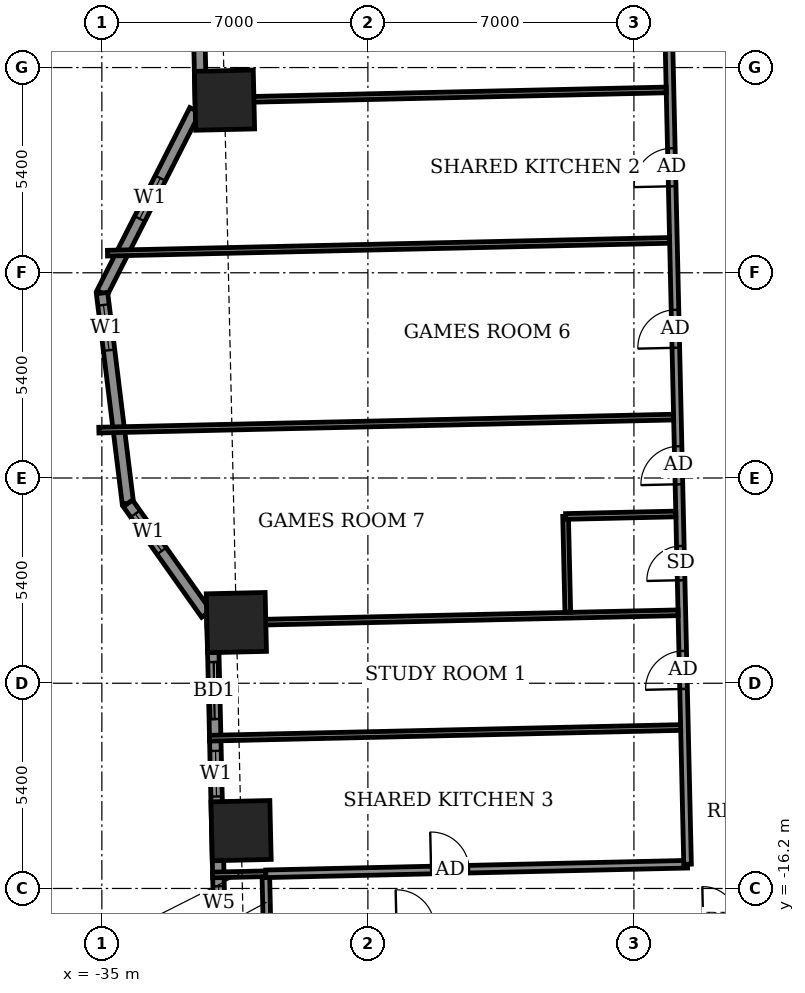
"""IFC4 building model, lengths in metres.
Left out: names, types, materials, properties, quantities, classifications, styles, units other than length and angle.
Written with IfcOpenShell. Run it as: python <this file> out.ifc"""

import sys

from ifc_helpers import new_model, si_unit, direction, frame, frame_2d, origin, origin_2d, place, context, subcontext, project, spatial, rectangle, extrude, element, fill, save


model = new_model("IFC4")
c1 = context("Model", 3, precision=1e-05, world=origin(), true_north=direction((0.0, 1.0)))
c2 = subcontext(c1, "Body", "Model", "MODEL_VIEW")
j1 = project(units=[si_unit("LENGTHUNIT", "METRE"), si_unit("PLANEANGLEUNIT", "RADIAN")], contexts=[c1])
p1 = place(None, origin())
s1 = spatial("IfcSite", under=j1, at=p1, CompositionType="ELEMENT")
p2 = place(p1, origin())
s2 = spatial("IfcBuilding", under=s1, at=p2, CompositionType="ELEMENT")
p3 = place(p2, frame((0.0, 0.0, 34.1)))
s3 = spatial("IfcBuildingStorey", under=s2, at=p3, CompositionType="ELEMENT", Elevation=34.1)
for number, where, z_axis, x_axis in (
    (1, (-31.461, -9.204, -0.55), (0.0, 0.0, 1.0), (0.023, -1.0, 0.0)),
    (2, (-31.337, -14.678, -0.55), (0.0, 0.0, 1.0), (0.023, -1.0, 0.0)),
    (3, (-31.773, 4.542, -0.55), (0.0, 0.0, 1.0), (0.023, -1.0, 0.0)),
):
    element("IfcColumn", number, at=place(p3, frame(where, z_axis=z_axis, x_axis=x_axis)), inside=s3, PredefinedType="COLUMN", context=c2, shape_type="SweptSolid", body=[
        extrude(rectangle(XDim=1.55, YDim=1.55, at=origin_2d()), origin(), (0.0, 0.0, 1.0), 3.6),
    ])
p4 = place(p3, frame((-32.758, 20.399, 0.0), z_axis=(0.0, 0.0, 1.0), x_axis=(0.022668485183, -0.999743036875, 0.0)))
e4 = element("IfcWall", 4, at=p4, inside=s3, PredefinedType="SOLIDWALL", context=c2, shape_type="SweptSolid", body=[
    extrude(rectangle(XDim=15.929, YDim=0.3, at=frame_2d((7.964, 0.0))), origin(), (0.0, 0.0, 1.0), 3.05),
])
p5 = place(p4, frame((2.183, 0.0, 0.0)))
e5 = element("IfcOpeningElement", 5, at=p5, cuts=e4, PredefinedType="OPENING", context=c2, shape_type="SweptSolid", body=[
    extrude(rectangle(XDim=1.5, YDim=2.4, at=frame_2d((0.75, 1.2))), frame((0.0, 0.16, 0.0), z_axis=(0.0, -1.0, 0.0), x_axis=(1.0, 0.0, 0.0)), (0.0, 0.0, 1.0), 0.32),
])
p6 = place(p4, frame((12.004, 0.0, 0.9)))
e6 = element("IfcOpeningElement", 6, at=p6, cuts=e4, PredefinedType="OPENING", context=c2, shape_type="SweptSolid", body=[
    extrude(rectangle(XDim=2.4, YDim=1.5, at=frame_2d((1.2, 0.75))), frame((0.0, 0.16, 0.0), z_axis=(0.0, -1.0, 0.0), x_axis=(1.0, 0.0, 0.0)), (0.0, 0.0, 1.0), 0.32),
])
p7 = place(p3, frame((-32.552, 4.28, 0.0), z_axis=(0.0, 0.0, 1.0), x_axis=(-0.452703975507, -0.891660871946, 0.0)))
e7 = element("IfcWall", 7, at=p7, inside=s3, PredefinedType="SOLIDWALL", context=c2, shape_type="SweptSolid", body=[
    extrude(rectangle(XDim=5.399, YDim=0.3, at=frame_2d((2.699, 0.0))), origin(), (0.0, 0.0, 1.0), 3.05),
])
p8 = place(p7, frame((2.007, 0.0, 0.9)))
e8 = element("IfcOpeningElement", 8, at=p8, cuts=e7, PredefinedType="OPENING", context=c2, shape_type="SweptSolid", body=[
    extrude(rectangle(XDim=1.2, YDim=1.5, at=frame_2d((0.6, 0.75))), frame((0.0, 0.16, 0.0), z_axis=(0.0, -1.0, 0.0), x_axis=(1.0, 0.0, 0.0)), (0.0, 0.0, 1.0), 0.32),
])
p9 = place(p3, frame((-34.996, -0.534, 0.0), z_axis=(0.0, 0.0, 1.0), x_axis=(0.122206978992, -0.992504636909, 0.0)))
e9 = element("IfcWall", 9, at=p9, inside=s3, PredefinedType="SOLIDWALL", context=c2, shape_type="SweptSolid", body=[
    extrude(rectangle(XDim=5.574, YDim=0.3, at=frame_2d((2.787, 0.0))), origin(), (0.0, 0.0, 1.0), 3.05),
])
p10 = place(p9, frame((0.315, 0.0, 0.9)))
e10 = element("IfcOpeningElement", 10, at=p10, cuts=e9, PredefinedType="OPENING", context=c2, shape_type="SweptSolid", body=[
    extrude(rectangle(XDim=1.2, YDim=1.5, at=frame_2d((0.6, 0.75))), frame((0.0, 0.16, 0.0), z_axis=(0.0, -1.0, 0.0), x_axis=(1.0, 0.0, 0.0)), (0.0, 0.0, 1.0), 0.32),
])
p11 = place(p3, frame((-34.315, -6.066, 0.0), z_axis=(0.0, 0.0, 1.0), x_axis=(0.578062893695, -0.815992212544, 0.0)))
e11 = element("IfcWall", 11, at=p11, inside=s3, PredefinedType="SOLIDWALL", context=c2, shape_type="SweptSolid", body=[
    extrude(rectangle(XDim=3.569, YDim=0.3, at=frame_2d((1.784, 0.0))), origin(), (0.0, 0.0, 1.0), 3.05),
])
p12 = place(p11, frame((0.338, 0.0, 0.9)))
e12 = element("IfcOpeningElement", 12, at=p12, cuts=e11, PredefinedType="OPENING", context=c2, shape_type="SweptSolid", body=[
    extrude(rectangle(XDim=1.2, YDim=1.5, at=frame_2d((0.6, 0.75))), frame((0.0, 0.16, 0.0), z_axis=(0.0, -1.0, 0.0), x_axis=(1.0, 0.0, 0.0)), (0.0, 0.0, 1.0), 0.32),
])
p13 = place(p3, frame((-32.087, -9.164, 0.0), z_axis=(0.0, 0.0, 1.0), x_axis=(0.022651102902, -0.999743430855, 0.0)))
e13 = element("IfcWall", 13, at=p13, inside=s3, PredefinedType="SOLIDWALL", context=c2, shape_type="SweptSolid", body=[
    extrude(rectangle(XDim=16.329, YDim=0.3, at=frame_2d((8.165, 0.0))), origin(), (0.0, 0.0, 1.0), 3.05),
])
p14 = place(p13, frame((1.079, 0.0, 0.0)))
e14 = element("IfcOpeningElement", 14, at=p14, cuts=e13, PredefinedType="OPENING", context=c2, shape_type="SweptSolid", body=[
    extrude(rectangle(XDim=1.5, YDim=2.4, at=frame_2d((0.75, 1.2))), frame((0.0, 0.16, 0.0), z_axis=(0.0, -1.0, 0.0), x_axis=(1.0, 0.0, 0.0)), (0.0, 0.0, 1.0), 0.32),
])
p15 = place(p13, frame((3.417, 0.0, 0.9)))
e15 = element("IfcOpeningElement", 15, at=p15, cuts=e13, PredefinedType="OPENING", context=c2, shape_type="SweptSolid", body=[
    extrude(rectangle(XDim=1.2, YDim=1.5, at=frame_2d((0.6, 0.75))), frame((0.0, 0.16, 0.0), z_axis=(0.0, -1.0, 0.0), x_axis=(1.0, 0.0, 0.0)), (0.0, 0.0, 1.0), 0.32),
])
p16 = place(p13, frame((6.979, 0.0, 0.9)))
e16 = element("IfcOpeningElement", 16, at=p16, cuts=e13, PredefinedType="OPENING", context=c2, shape_type="SweptSolid", body=[
    extrude(rectangle(XDim=0.9, YDim=1.5, at=frame_2d((0.45, 0.75))), frame((0.0, 0.16, 0.0), z_axis=(0.0, -1.0, 0.0), x_axis=(1.0, 0.0, 0.0)), (0.0, 0.0, 1.0), 0.32),
])
p17 = place(p13, frame((12.15, 0.0, 0.9)))
e17 = element("IfcOpeningElement", 17, at=p17, cuts=e13, PredefinedType="OPENING", context=c2, shape_type="SweptSolid", body=[
    extrude(rectangle(XDim=2.4, YDim=1.5, at=frame_2d((1.2, 0.75))), frame((0.0, 0.16, 0.0), z_axis=(0.0, -1.0, 0.0), x_axis=(1.0, 0.0, 0.0)), (0.0, 0.0, 1.0), 0.32),
])
p18 = place(p3, frame((-30.652, -17.313, 0.0), z_axis=(0.0, 0.0, 1.0), x_axis=(0.999742623764, 0.02268669719, 0.0)))
e18 = element("IfcWall", 18, at=p18, inside=s3, PredefinedType="PARTITIONING", context=c2, shape_type="SweptSolid", body=[
    extrude(rectangle(XDim=58.8, YDim=0.2, at=frame_2d((29.4, 0.0))), origin(), (0.0, 0.0, 1.0), 3.05),
])
p19 = place(p18, frame((3.406, 0.0, 0.0)))
e19 = element("IfcOpeningElement", 19, at=p19, cuts=e18, PredefinedType="OPENING", context=c2, shape_type="SweptSolid", body=[
    extrude(rectangle(XDim=1.0, YDim=2.1, at=frame_2d((0.5, 1.05))), frame((0.0, 0.11, 0.0), z_axis=(0.0, -1.0, 0.0), x_axis=(1.0, 0.0, 0.0)), (0.0, 0.0, 1.0), 0.22),
])
p20 = place(p18, frame((11.475, 0.0, 0.0)))
e20 = element("IfcOpeningElement", 20, at=p20, cuts=e18, PredefinedType="OPENING", context=c2, shape_type="SweptSolid", body=[
    extrude(rectangle(XDim=0.9, YDim=2.1, at=frame_2d((0.45, 1.05))), frame((0.0, 0.11, 0.0), z_axis=(0.0, -1.0, 0.0), x_axis=(1.0, 0.0, 0.0)), (0.0, 0.0, 1.0), 0.22),
])
p21 = place(p18, frame((13.55, 0.0, 0.0)))
e21 = element("IfcOpeningElement", 21, at=p21, cuts=e18, PredefinedType="OPENING", context=c2, shape_type="SweptSolid", body=[
    extrude(rectangle(XDim=0.9, YDim=2.1, at=frame_2d((0.45, 1.05))), frame((0.0, 0.11, 0.0), z_axis=(0.0, -1.0, 0.0), x_axis=(1.0, 0.0, 0.0)), (0.0, 0.0, 1.0), 0.22),
])
p22 = place(p18, frame((20.375, 0.0, 0.0)))
e22 = element("IfcOpeningElement", 22, at=p22, cuts=e18, PredefinedType="OPENING", context=c2, shape_type="SweptSolid", body=[
    extrude(rectangle(XDim=0.9, YDim=2.1, at=frame_2d((0.45, 1.05))), frame((0.0, 0.11, 0.0), z_axis=(0.0, -1.0, 0.0), x_axis=(1.0, 0.0, 0.0)), (0.0, 0.0, 1.0), 0.22),
])
p23 = place(p18, frame((22.625, 0.0, 0.0)))
e23 = element("IfcOpeningElement", 23, at=p23, cuts=e18, PredefinedType="OPENING", context=c2, shape_type="SweptSolid", body=[
    extrude(rectangle(XDim=0.9, YDim=2.1, at=frame_2d((0.45, 1.05))), frame((0.0, 0.11, 0.0), z_axis=(0.0, -1.0, 0.0), x_axis=(1.0, 0.0, 0.0)), (0.0, 0.0, 1.0), 0.22),
])
p24 = place(p18, frame((29.65, 0.0, 0.0)))
e24 = element("IfcOpeningElement", 24, at=p24, cuts=e18, PredefinedType="OPENING", context=c2, shape_type="SweptSolid", body=[
    extrude(rectangle(XDim=0.9, YDim=2.1, at=frame_2d((0.45, 1.05))), frame((0.0, 0.11, 0.0), z_axis=(0.0, -1.0, 0.0), x_axis=(1.0, 0.0, 0.0)), (0.0, 0.0, 1.0), 0.22),
])
p25 = place(p18, frame((31.875, 0.0, 0.0)))
e25 = element("IfcOpeningElement", 25, at=p25, cuts=e18, PredefinedType="OPENING", context=c2, shape_type="SweptSolid", body=[
    extrude(rectangle(XDim=0.9, YDim=2.1, at=frame_2d((0.45, 1.05))), frame((0.0, 0.11, 0.0), z_axis=(0.0, -1.0, 0.0), x_axis=(1.0, 0.0, 0.0)), (0.0, 0.0, 1.0), 0.22),
])
p26 = place(p18, frame((38.9, 0.0, 0.0)))
e26 = element("IfcOpeningElement", 26, at=p26, cuts=e18, PredefinedType="OPENING", context=c2, shape_type="SweptSolid", body=[
    extrude(rectangle(XDim=0.9, YDim=2.1, at=frame_2d((0.45, 1.05))), frame((0.0, 0.11, 0.0), z_axis=(0.0, -1.0, 0.0), x_axis=(1.0, 0.0, 0.0)), (0.0, 0.0, 1.0), 0.22),
])
p27 = place(p18, frame((41.025, 0.0, 0.0)))
e27 = element("IfcOpeningElement", 27, at=p27, cuts=e18, PredefinedType="OPENING", context=c2, shape_type="SweptSolid", body=[
    extrude(rectangle(XDim=0.9, YDim=2.1, at=frame_2d((0.45, 1.05))), frame((0.0, 0.11, 0.0), z_axis=(0.0, -1.0, 0.0), x_axis=(1.0, 0.0, 0.0)), (0.0, 0.0, 1.0), 0.22),
])
p28 = place(p18, frame((47.95, 0.0, 0.0)))
e28 = element("IfcOpeningElement", 28, at=p28, cuts=e18, PredefinedType="OPENING", context=c2, shape_type="SweptSolid", body=[
    extrude(rectangle(XDim=0.9, YDim=2.1, at=frame_2d((0.45, 1.05))), frame((0.0, 0.11, 0.0), z_axis=(0.0, -1.0, 0.0), x_axis=(1.0, 0.0, 0.0)), (0.0, 0.0, 1.0), 0.22),
])
p29 = place(p18, frame((55.6, 0.0, 0.0)))
e29 = element("IfcOpeningElement", 29, at=p29, cuts=e18, PredefinedType="OPENING", context=c2, shape_type="SweptSolid", body=[
    extrude(rectangle(XDim=1.0, YDim=2.1, at=frame_2d((0.5, 1.05))), frame((0.0, 0.11, 0.0), z_axis=(0.0, -1.0, 0.0), x_axis=(1.0, 0.0, 0.0)), (0.0, 0.0, 1.0), 0.22),
])
p30 = place(p18, frame((50.25, 0.0, 0.0)))
e30 = element("IfcOpeningElement", 30, at=p30, cuts=e18, PredefinedType="OPENING", context=c2, shape_type="SweptSolid", body=[
    extrude(rectangle(XDim=0.9, YDim=2.1, at=frame_2d((0.45, 1.05))), frame((0.0, 0.11, 0.0), z_axis=(0.0, -1.0, 0.0), x_axis=(1.0, 0.0, 0.0)), (0.0, 0.0, 1.0), 0.22),
])
p31 = place(p3, frame((-30.652, -17.313, 0.0), z_axis=(0.0, 0.0, 1.0), x_axis=(-0.022632637625, 0.99974384905, 0.0)))
e31 = element("IfcWall", 31, at=p31, inside=s3, PredefinedType="PARTITIONING", context=c2, shape_type="SweptSolid", body=[
    extrude(rectangle(XDim=1.5, YDim=0.2, at=frame_2d((0.75, 0.0))), origin(), (0.0, 0.0, 1.0), 3.05),
])
p32 = place(p3, frame((-32.086, -15.845, 0.0), z_axis=(0.0, 0.0, 1.0), x_axis=(0.999740667531, 0.022772739949, 0.0)))
e32 = element("IfcWall", 32, at=p32, inside=s3, PredefinedType="PARTITIONING", context=c2, shape_type="SweptSolid", body=[
    extrude(rectangle(XDim=1.404, YDim=0.15, at=frame_2d((0.702, 0.0))), origin(), (0.0, 0.0, 1.0), 2.55),
])
p33 = place(p3, frame((-30.686, -15.814, 0.0), z_axis=(0.0, 0.0, 1.0), x_axis=(0.999742346277, 0.022698921993, 0.0)))
e33 = element("IfcWall", 33, at=p33, inside=s3, PredefinedType="PARTITIONING", context=c2, shape_type="SweptSolid", body=[
    extrude(rectangle(XDim=11.1, YDim=0.2, at=frame_2d((5.55, 0.0))), origin(), (0.0, 0.0, 1.0), 3.05),
])
p34 = place(p33, frame((4.35, 0.0, 0.0)))
e34 = element("IfcOpeningElement", 34, at=p34, cuts=e33, PredefinedType="OPENING", context=c2, shape_type="SweptSolid", body=[
    extrude(rectangle(XDim=1.0, YDim=2.1, at=frame_2d((0.5, 1.05))), frame((0.0, 0.11, 0.0), z_axis=(0.0, -1.0, 0.0), x_axis=(1.0, 0.0, 0.0)), (0.0, 0.0, 1.0), 0.22),
])
p35 = place(p3, frame((-19.589, -15.562, 0.0), z_axis=(0.0, 0.0, 1.0), x_axis=(-0.02267447203, 0.999742901109, 0.0)))
e35 = element("IfcWall", 35, at=p35, inside=s3, PredefinedType="PARTITIONING", context=c2, shape_type="SweptSolid", body=[
    extrude(rectangle(XDim=27.65, YDim=0.2, at=frame_2d((13.825, 0.0))), origin(), (0.0, 0.0, 1.0), 3.05),
])
p36 = place(p35, frame((22.313, 0.0, 0.0)))
e36 = element("IfcOpeningElement", 36, at=p36, cuts=e35, PredefinedType="OPENING", context=c2, shape_type="SweptSolid", body=[
    extrude(rectangle(XDim=1.0, YDim=2.1, at=frame_2d((0.5, 1.05))), frame((0.0, 0.11, 0.0), z_axis=(0.0, -1.0, 0.0), x_axis=(1.0, 0.0, 0.0)), (0.0, 0.0, 1.0), 0.22),
])
p37 = place(p35, frame((26.0, 0.0, 0.0)))
e37 = element("IfcOpeningElement", 37, at=p37, cuts=e35, PredefinedType="OPENING", context=c2, shape_type="SweptSolid", body=[
    extrude(rectangle(XDim=0.9, YDim=2.1, at=frame_2d((0.45, 1.05))), frame((0.0, 0.11, 0.0), z_axis=(0.0, -1.0, 0.0), x_axis=(1.0, 0.0, 0.0)), (0.0, 0.0, 1.0), 0.22),
])
p38 = place(p35, frame((17.843, 0.0, 0.0)))
e38 = element("IfcOpeningElement", 38, at=p38, cuts=e35, PredefinedType="OPENING", context=c2, shape_type="SweptSolid", body=[
    extrude(rectangle(XDim=1.0, YDim=2.1, at=frame_2d((0.5, 1.05))), frame((0.0, 0.11, 0.0), z_axis=(0.0, -1.0, 0.0), x_axis=(1.0, 0.0, 0.0)), (0.0, 0.0, 1.0), 0.22),
])
p39 = place(p35, frame((13.592, 0.0, 0.0)))
e39 = element("IfcOpeningElement", 39, at=p39, cuts=e35, PredefinedType="OPENING", context=c2, shape_type="SweptSolid", body=[
    extrude(rectangle(XDim=1.0, YDim=2.1, at=frame_2d((0.5, 1.05))), frame((0.0, 0.11, 0.0), z_axis=(0.0, -1.0, 0.0), x_axis=(1.0, 0.0, 0.0)), (0.0, 0.0, 1.0), 0.22),
])
p40 = place(p35, frame((10.0, 0.0, 0.0)))
e40 = element("IfcOpeningElement", 40, at=p40, cuts=e35, PredefinedType="OPENING", context=c2, shape_type="SweptSolid", body=[
    extrude(rectangle(XDim=1.0, YDim=2.1, at=frame_2d((0.5, 1.05))), frame((0.0, 0.11, 0.0), z_axis=(0.0, -1.0, 0.0), x_axis=(1.0, 0.0, 0.0)), (0.0, 0.0, 1.0), 0.22),
])
p41 = place(p35, frame((7.475, 0.0, 0.0)))
e41 = element("IfcOpeningElement", 41, at=p41, cuts=e35, PredefinedType="OPENING", context=c2, shape_type="SweptSolid", body=[
    extrude(rectangle(XDim=0.9, YDim=2.1, at=frame_2d((0.45, 1.05))), frame((0.0, 0.11, 0.0), z_axis=(0.0, -1.0, 0.0), x_axis=(1.0, 0.0, 0.0)), (0.0, 0.0, 1.0), 0.22),
])
p42 = place(p35, frame((4.613, 0.0, 0.0)))
e42 = element("IfcOpeningElement", 42, at=p42, cuts=e35, PredefinedType="OPENING", context=c2, shape_type="SweptSolid", body=[
    extrude(rectangle(XDim=1.0, YDim=2.1, at=frame_2d((0.5, 1.05))), frame((0.0, 0.11, 0.0), z_axis=(0.0, -1.0, 0.0), x_axis=(1.0, 0.0, 0.0)), (0.0, 0.0, 1.0), 0.22),
])
p43 = place(p3, frame((-32.167, -12.246, 0.0), z_axis=(0.0, 0.0, 1.0), x_axis=(0.999743155335, 0.022663260168, 0.0)))
e43 = element("IfcWall", 43, at=p43, inside=s3, PredefinedType="PARTITIONING", context=c2, shape_type="SweptSolid", body=[
    extrude(rectangle(XDim=12.399, YDim=0.15, at=frame_2d((6.2, 0.0))), origin(), (0.0, 0.0, 1.0), 2.55),
])
p44 = place(p3, frame((-32.236, -9.227, 0.0), z_axis=(0.0, 0.0, 1.0), x_axis=(0.999743195783, 0.022661475803, 0.0)))
e44 = element("IfcWall", 44, at=p44, inside=s3, PredefinedType="PARTITIONING", context=c2, shape_type="SweptSolid", body=[
    extrude(rectangle(XDim=12.4, YDim=0.15, at=frame_2d((6.2, 0.0))), origin(), (0.0, 0.0, 1.0), 3.05),
])
p45 = place(p3, frame((-22.74, -8.931, 0.0), z_axis=(0.0, 0.0, 1.0), x_axis=(-0.023015762656, 0.999735102249, 0.0)))
e45 = element("IfcWall", 45, at=p45, inside=s3, PredefinedType="PARTITIONING", context=c2, shape_type="SweptSolid", body=[
    extrude(rectangle(XDim=2.525, YDim=0.15, at=frame_2d((1.262, 0.0))), origin(), (0.0, 0.0, 1.0), 3.05),
])
p46 = place(p3, frame((-22.797, -6.412, 0.0), z_axis=(0.0, 0.0, 1.0), x_axis=(0.999739701447, 0.022815112345, 0.0)))
e46 = element("IfcWall", 46, at=p46, inside=s3, PredefinedType="PARTITIONING", context=c2, shape_type="SweptSolid", body=[
    extrude(rectangle(XDim=2.9, YDim=0.15, at=frame_2d((1.45, 0.0))), origin(), (0.0, 0.0, 1.0), 3.05),
])
p47 = place(p3, frame((-35.079, -4.14, 0.0), z_axis=(0.0, 0.0, 1.0), x_axis=(0.999743233457, 0.022659813699, 0.0)))
e47 = element("IfcWall", 47, at=p47, inside=s3, PredefinedType="PARTITIONING", context=c2, shape_type="SweptSolid", body=[
    extrude(rectangle(XDim=15.127, YDim=0.15, at=frame_2d((7.563, 0.0))), origin(), (0.0, 0.0, 1.0), 2.1),
])
p48 = place(p3, frame((-34.852, 0.516, 0.0), z_axis=(0.0, 0.0, 1.0), x_axis=(0.999742142166, 0.022707909997, 0.0)))
e48 = element("IfcWall", 48, at=p48, inside=s3, PredefinedType="PARTITIONING", context=c2, shape_type="SweptSolid", body=[
    extrude(rectangle(XDim=14.794, YDim=0.15, at=frame_2d((7.397, 0.0))), origin(), (0.0, 0.0, 1.0), 2.1),
])
p49 = place(p3, frame((-32.248, 4.536, 0.0), z_axis=(0.0, 0.0, 1.0), x_axis=(0.999741439573, 0.022738821441, 0.0)))
e49 = element("IfcWall", 49, at=p49, inside=s3, PredefinedType="PARTITIONING", context=c2, shape_type="SweptSolid", body=[
    extrude(rectangle(XDim=12.1, YDim=0.15, at=frame_2d((6.05, 0.0))), origin(), (0.0, 0.0, 1.0), 3.05),
])
p50 = place(p8, origin())
e50 = element("IfcWindow", 50, at=p50, inside=s3, PartitioningType="SINGLE_PANEL", PredefinedType="WINDOW", context=c2, shape_type="SweptSolid", body=[
    extrude(rectangle(XDim=1.2, YDim=1.5, at=frame_2d((0.6, 0.75))), frame((0.0, 0.03, 0.0), z_axis=(0.0, -1.0, 0.0), x_axis=(1.0, 0.0, 0.0)), (0.0, 0.0, 1.0), 0.06),
])
fill(e8, e50)
p51 = place(p10, origin())
e51 = element("IfcWindow", 51, at=p51, inside=s3, PartitioningType="SINGLE_PANEL", PredefinedType="WINDOW", context=c2, shape_type="SweptSolid", body=[
    extrude(rectangle(XDim=1.2, YDim=1.5, at=frame_2d((0.6, 0.75))), frame((0.0, 0.03, 0.0), z_axis=(0.0, -1.0, 0.0), x_axis=(1.0, 0.0, 0.0)), (0.0, 0.0, 1.0), 0.06),
])
fill(e10, e51)
p52 = place(p12, origin())
e52 = element("IfcWindow", 52, at=p52, inside=s3, PartitioningType="SINGLE_PANEL", PredefinedType="WINDOW", context=c2, shape_type="SweptSolid", body=[
    extrude(rectangle(XDim=1.2, YDim=1.5, at=frame_2d((0.6, 0.75))), frame((0.0, 0.03, 0.0), z_axis=(0.0, -1.0, 0.0), x_axis=(1.0, 0.0, 0.0)), (0.0, 0.0, 1.0), 0.06),
])
fill(e12, e52)
p53 = place(p14, origin())
e53 = element("IfcDoor", 53, at=p53, inside=s3, OperationType="SLIDING_TO_LEFT", PredefinedType="DOOR", context=c2, shape_type="SweptSolid", body=[
    extrude(rectangle(XDim=1.5, YDim=2.4, at=frame_2d((0.75, 1.2))), frame((0.0, 0.025, 0.0), z_axis=(0.0, -1.0, 0.0), x_axis=(1.0, 0.0, 0.0)), (0.0, 0.0, 1.0), 0.05),
])
fill(e14, e53)
p54 = place(p15, origin())
e54 = element("IfcWindow", 54, at=p54, inside=s3, PartitioningType="SINGLE_PANEL", PredefinedType="WINDOW", context=c2, shape_type="SweptSolid", body=[
    extrude(rectangle(XDim=1.2, YDim=1.5, at=frame_2d((0.6, 0.75))), frame((0.0, 0.03, 0.0), z_axis=(0.0, -1.0, 0.0), x_axis=(1.0, 0.0, 0.0)), (0.0, 0.0, 1.0), 0.06),
])
fill(e15, e54)
p55 = place(p16, origin())
e55 = element("IfcWindow", 55, at=p55, inside=s3, PartitioningType="SINGLE_PANEL", PredefinedType="WINDOW", context=c2, shape_type="SweptSolid", body=[
    extrude(rectangle(XDim=0.9, YDim=1.5, at=frame_2d((0.45, 0.75))), frame((0.0, 0.03, 0.0), z_axis=(0.0, -1.0, 0.0), x_axis=(1.0, 0.0, 0.0)), (0.0, 0.0, 1.0), 0.06),
])
fill(e16, e55)
p56 = place(p38, origin())
e56 = element("IfcDoor", 56, at=p56, inside=s3, OperationType="SINGLE_SWING_RIGHT", PredefinedType="DOOR", context=c2, shape_type="SweptSolid", body=[
    extrude(rectangle(XDim=1.0, YDim=2.1, at=frame_2d((0.5, 1.05))), frame((0.0, 0.025, 0.0), z_axis=(0.0, -1.0, 0.0), x_axis=(1.0, 0.0, 0.0)), (0.0, 0.0, 1.0), 0.05),
])
fill(e38, e56)
p57 = place(p39, origin())
e57 = element("IfcDoor", 57, at=p57, inside=s3, OperationType="SINGLE_SWING_LEFT", PredefinedType="DOOR", context=c2, shape_type="SweptSolid", body=[
    extrude(rectangle(XDim=1.0, YDim=2.1, at=frame_2d((0.5, 1.05))), frame((0.0, 0.025, 0.0), z_axis=(0.0, -1.0, 0.0), x_axis=(1.0, 0.0, 0.0)), (0.0, 0.0, 1.0), 0.05),
])
fill(e39, e57)
p58 = place(p40, origin())
e58 = element("IfcDoor", 58, at=p58, inside=s3, OperationType="SINGLE_SWING_RIGHT", PredefinedType="DOOR", context=c2, shape_type="SweptSolid", body=[
    extrude(rectangle(XDim=1.0, YDim=2.1, at=frame_2d((0.5, 1.05))), frame((0.0, 0.025, 0.0), z_axis=(0.0, -1.0, 0.0), x_axis=(1.0, 0.0, 0.0)), (0.0, 0.0, 1.0), 0.05),
])
fill(e40, e58)
p59 = place(p41, origin())
e59 = element("IfcDoor", 59, at=p59, inside=s3, OperationType="SINGLE_SWING_LEFT", PredefinedType="DOOR", context=c2, shape_type="SweptSolid", body=[
    extrude(rectangle(XDim=0.9, YDim=2.1, at=frame_2d((0.45, 1.05))), frame((0.0, 0.025, 0.0), z_axis=(0.0, -1.0, 0.0), x_axis=(1.0, 0.0, 0.0)), (0.0, 0.0, 1.0), 0.05),
])
fill(e41, e59)
p60 = place(p42, origin())
e60 = element("IfcDoor", 60, at=p60, inside=s3, OperationType="SINGLE_SWING_LEFT", PredefinedType="DOOR", context=c2, shape_type="SweptSolid", body=[
    extrude(rectangle(XDim=1.0, YDim=2.1, at=frame_2d((0.5, 1.05))), frame((0.0, 0.025, 0.0), z_axis=(0.0, -1.0, 0.0), x_axis=(1.0, 0.0, 0.0)), (0.0, 0.0, 1.0), 0.05),
])
fill(e42, e60)
p61 = place(p34, origin())
e61 = element("IfcDoor", 61, at=p61, inside=s3, OperationType="SINGLE_SWING_RIGHT", PredefinedType="DOOR", context=c2, shape_type="SweptSolid", body=[
    extrude(rectangle(XDim=1.0, YDim=2.1, at=frame_2d((0.5, 1.05))), frame((0.0, 0.025, 0.0), z_axis=(0.0, -1.0, 0.0), x_axis=(1.0, 0.0, 0.0)), (0.0, 0.0, 1.0), 0.05),
])
fill(e34, e61)
save(model, sys.argv[1])
